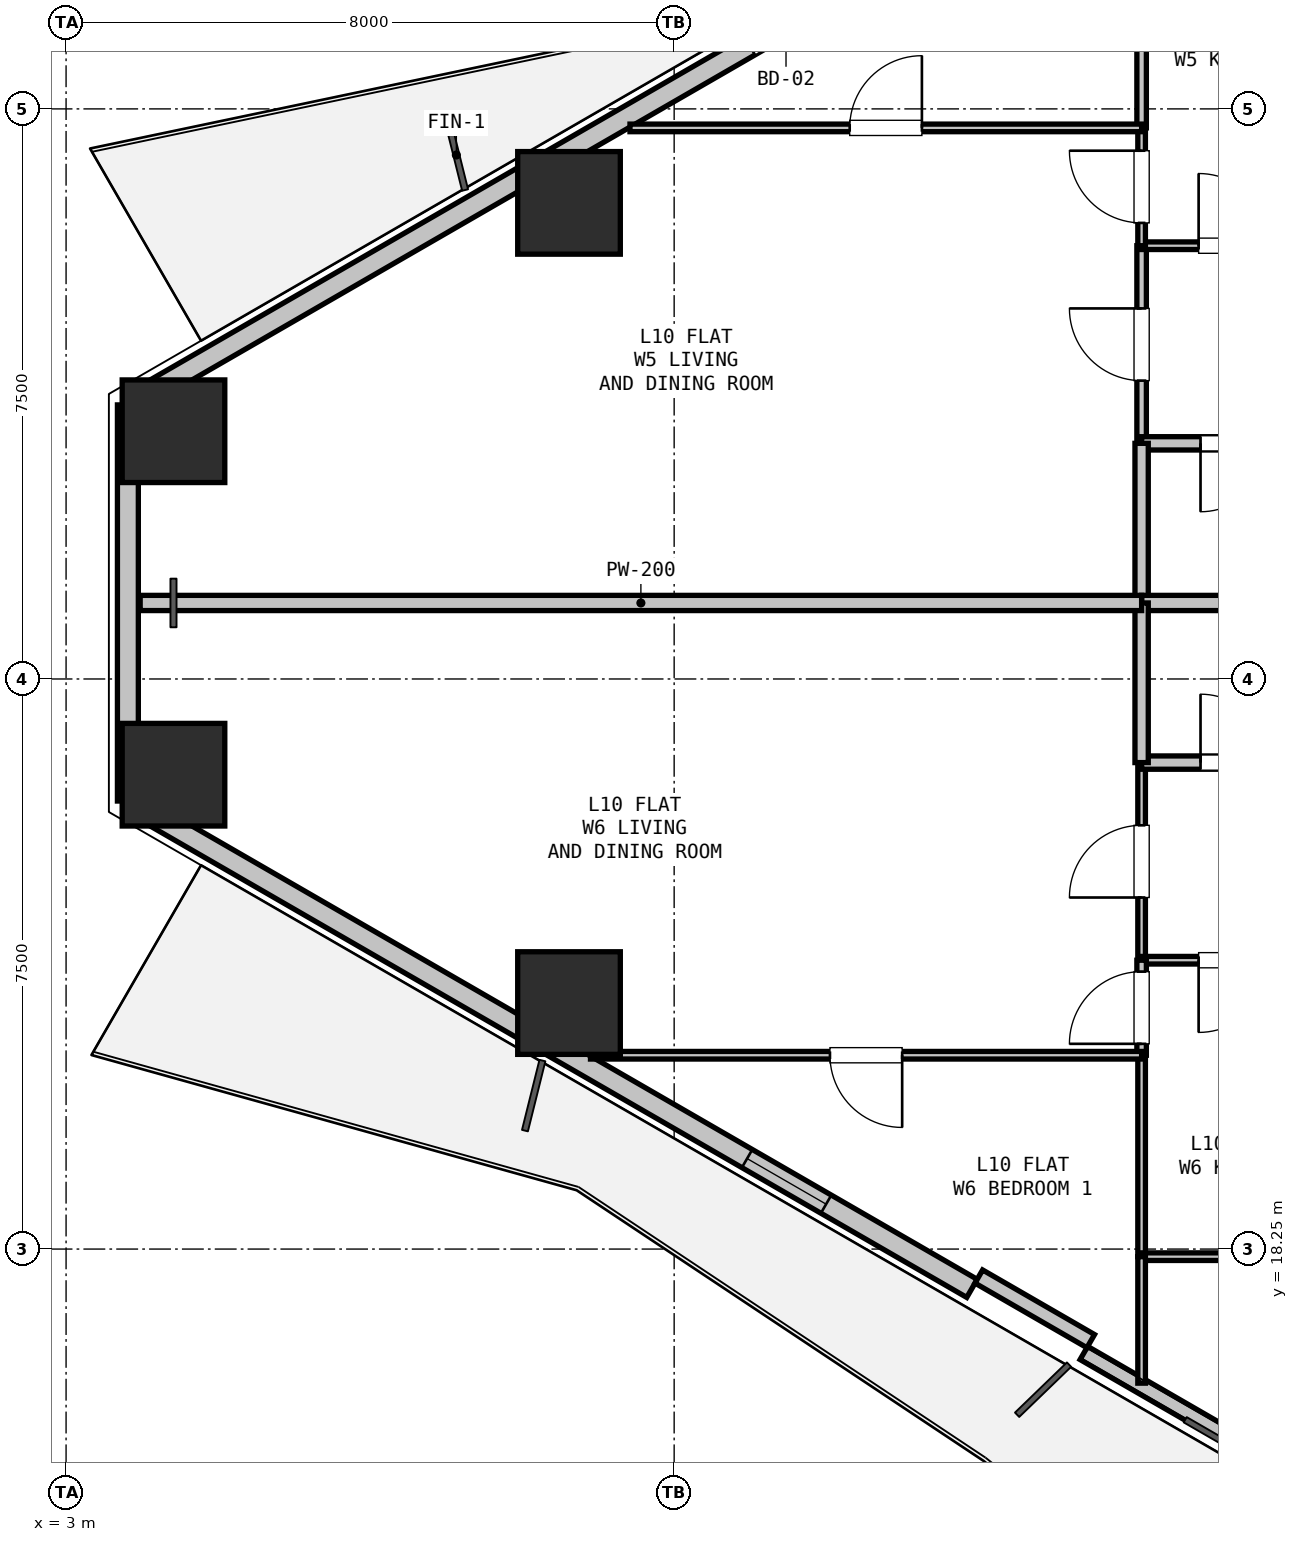
"""IFC4 building model, lengths in metres.
Left out: names, types, materials, properties, quantities, classifications, styles, units other than length and angle.
Written with IfcOpenShell. Run it as: python <this file> out.ifc"""

import sys

from ifc_helpers import new_model, si_unit, direction, frame, frame_2d, origin, origin_2d, place, context, subcontext, project, spatial, rectangle, hollow_rectangle, extrude, element, fill, save


model = new_model("IFC4")
c1 = context("Model", 3, precision=1e-05, world=origin(), true_north=direction((0.0, 1.0)))
c2 = subcontext(c1, "Body", "Model", "MODEL_VIEW")
j1 = project(units=[si_unit("LENGTHUNIT", "METRE"), si_unit("PLANEANGLEUNIT", "RADIAN")], contexts=[c1])
p1 = place(None, origin())
s1 = spatial("IfcSite", under=j1, at=p1, CompositionType="ELEMENT")
p2 = place(p1, origin())
s2 = spatial("IfcBuilding", under=s1, at=p2, CompositionType="ELEMENT")
p3 = place(p2, frame((0.0, 0.0, 39.0)))
s3 = spatial("IfcBuildingStorey", under=s2, at=p3, CompositionType="ELEMENT", Elevation=39.0)
for number, where, z_axis, x_axis in (
    (1, (4.413, 29.009, 0.0), (0.0, 0.0, 1.0), (1.0, 0.0, 0.0)),
    (2, (9.617, 32.014, 0.0), (0.0, 0.0, 1.0), (1.0, 0.0, 0.0)),
    (3, (9.617, 21.486, 0.0), (0.0, 0.0, 1.0), (1.0, 0.0, 0.0)),
    (4, (4.413, 24.491, 0.0), (0.0, 0.0, 1.0), (1.0, 0.0, 0.0)),
):
    element("IfcColumn", number, at=place(p3, frame(where, z_axis=z_axis, x_axis=x_axis)), inside=s3, PredefinedType="COLUMN", context=c2, shape_type="SweptSolid", body=[
        extrude(hollow_rectangle(XDim=1.35, YDim=1.35, WallThickness=0.036, at=origin_2d()), origin(), (0.0, 0.0, 1.0), 3.3),
    ])
p4 = place(p3, frame((3.813, 24.144, 0.0), z_axis=(0.0, 0.0, 1.0), x_axis=(0.0, 1.0, 0.0)))
e5 = element("IfcWall", 5, at=p4, inside=s3, PredefinedType="SOLIDWALL", context=c2, shape_type="SweptSolid", body=[
    extrude(rectangle(XDim=5.211, YDim=0.275, at=frame_2d((2.606, 0.0))), origin(), (0.0, 0.0, 1.0), 2.66),
])
p5 = place(p3, frame((3.943, 29.431, 0.0), z_axis=(0.0, 0.0, 1.0), x_axis=(0.866027105532, 0.499997052475, 0.0)))
e6 = element("IfcWall", 6, at=p5, inside=s3, PredefinedType="SOLIDWALL", context=c2, shape_type="SweptSolid", body=[
    extrude(rectangle(XDim=12.673, YDim=0.275, at=frame_2d((6.336, 0.0))), origin(), (0.0, 0.0, 1.0), 2.66),
])
p6 = place(p5, frame((9.298, 0.0, 0.0)))
e7 = element("IfcOpeningElement", 7, at=p6, cuts=e6, PredefinedType="OPENING", context=c2, shape_type="SweptSolid", body=[
    extrude(rectangle(XDim=1.1, YDim=2.1, at=frame_2d((0.55, 1.05))), frame((0.0, 0.147, 0.0), z_axis=(0.0, -1.0, 0.0), x_axis=(1.0, 0.0, 0.0)), (0.0, 0.0, 1.0), 0.295),
])
p7 = place(p3, frame((26.76, 10.896, 0.0), z_axis=(0.0, 0.0, 1.0), x_axis=(-0.866027351828, 0.499996625875, 0.0)))
e8 = element("IfcWall", 8, at=p7, inside=s3, PredefinedType="PARAPET", context=c2, shape_type="SweptSolid", body=[
    extrude(rectangle(XDim=11.973, YDim=0.2, at=frame_2d((5.987, 0.0))), origin(), (0.0, 0.0, 1.0), 0.2),
])
p8 = place(p3, frame((14.918, 17.733, 0.0), z_axis=(0.0, 0.0, 1.0), x_axis=(-0.866027105532, 0.499997052475, 0.0)))
e9 = element("IfcWall", 9, at=p8, inside=s3, PredefinedType="SOLIDWALL", context=c2, shape_type="SweptSolid", body=[
    extrude(rectangle(XDim=12.673, YDim=0.275, at=frame_2d((6.336, 0.0))), origin(), (0.0, 0.0, 1.0), 2.66),
])
p9 = place(p8, frame((2.216, 0.0, 0.9)))
e10 = element("IfcOpeningElement", 10, at=p9, cuts=e9, PredefinedType="OPENING", context=c2, shape_type="SweptSolid", body=[
    extrude(rectangle(XDim=1.2, YDim=1.4, at=frame_2d((0.6, 0.7))), frame((0.0, 0.147, 0.0), z_axis=(0.0, -1.0, 0.0), x_axis=(1.0, 0.0, 0.0)), (0.0, 0.0, 1.0), 0.295),
])
p10 = place(p3, frame((16.48, 17.039, 0.0), z_axis=(0.0, 0.0, 1.0), x_axis=(-0.86605165483, 0.499954529098, 0.0)))
e11 = element("IfcWall", 11, at=p10, inside=s3, PredefinedType="PARAPET", context=c2, shape_type="SweptSolid", body=[
    extrude(rectangle(XDim=1.7, YDim=0.2, at=frame_2d((0.85, 0.0))), origin(), (0.0, 0.0, 1.0), 2.66),
])
p11 = place(p3, frame((17.15, 28.85, 0.0), z_axis=(0.0, 0.0, 1.0), x_axis=(0.0, 1.0, 0.0)))
e12 = element("IfcWall", 12, at=p11, inside=s3, PredefinedType="PARTITIONING", context=c2, shape_type="SweptSolid", body=[
    extrude(rectangle(XDim=2.6, YDim=0.125, at=frame_2d((1.3, 0.0))), origin(), (0.0, 0.0, 1.0), 3.04),
])
p12 = place(p11, frame((0.825, 0.0, 0.0)))
e13 = element("IfcOpeningElement", 13, at=p12, cuts=e12, PredefinedType="OPENING", context=c2, shape_type="SweptSolid", body=[
    extrude(rectangle(XDim=0.95, YDim=2.1, at=frame_2d((0.475, 1.05))), frame((0.0, 0.073, 0.0), z_axis=(0.0, -1.0, 0.0), x_axis=(1.0, 0.0, 0.0)), (0.0, 0.0, 1.0), 0.145),
])
p13 = place(p3, frame((17.15, 31.45, 0.0), z_axis=(0.0, 0.0, 1.0), x_axis=(1.0, 0.0, 0.0)))
e14 = element("IfcWall", 14, at=p13, inside=s3, PredefinedType="PARTITIONING", context=c2, shape_type="SweptSolid", body=[
    extrude(rectangle(XDim=2.45, YDim=0.1, at=frame_2d((1.225, 0.0))), origin(), (0.0, 0.0, 1.0), 3.04),
])
p14 = place(p13, frame((0.75, 0.0, 0.0)))
e15 = element("IfcOpeningElement", 15, at=p14, cuts=e14, PredefinedType="OPENING", context=c2, shape_type="SweptSolid", body=[
    extrude(rectangle(XDim=0.95, YDim=2.1, at=frame_2d((0.475, 1.05))), frame((0.0, 0.06, 0.0), z_axis=(0.0, -1.0, 0.0), x_axis=(1.0, 0.0, 0.0)), (0.0, 0.0, 1.0), 0.12),
])
p15 = place(p3, frame((19.6, 28.85, 0.0), z_axis=(0.0, 0.0, 1.0), x_axis=(-1.0, 0.0, 0.0)))
e16 = element("IfcWall", 16, at=p15, inside=s3, PredefinedType="PLUMBINGWALL", context=c2, shape_type="SweptSolid", body=[
    extrude(rectangle(XDim=2.45, YDim=0.175, at=frame_2d((1.225, 0.0))), origin(), (0.0, 0.0, 1.0), 3.04),
])
p16 = place(p15, frame((0.775, 0.0, 0.0)))
e17 = element("IfcOpeningElement", 17, at=p16, cuts=e16, PredefinedType="OPENING", context=c2, shape_type="SweptSolid", body=[
    extrude(rectangle(XDim=0.9, YDim=2.1, at=frame_2d((0.45, 1.05))), frame((0.0, 0.097, 0.0), z_axis=(0.0, -1.0, 0.0), x_axis=(1.0, 0.0, 0.0)), (0.0, 0.0, 1.0), 0.195),
])
p17 = place(p3, frame((17.15, 22.05, 0.0), z_axis=(0.0, 0.0, 1.0), x_axis=(0.0, 1.0, 0.0)))
e18 = element("IfcWall", 18, at=p17, inside=s3, PredefinedType="PARTITIONING", context=c2, shape_type="SweptSolid", body=[
    extrude(rectangle(XDim=2.6, YDim=0.1, at=frame_2d((1.3, 0.0))), origin(), (0.0, 0.0, 1.0), 3.04),
])
p18 = place(p17, frame((0.825, 0.0, 0.0)))
e19 = element("IfcOpeningElement", 19, at=p18, cuts=e18, PredefinedType="OPENING", context=c2, shape_type="SweptSolid", body=[
    extrude(rectangle(XDim=0.95, YDim=2.1, at=frame_2d((0.475, 1.05))), frame((0.0, 0.06, 0.0), z_axis=(0.0, -1.0, 0.0), x_axis=(1.0, 0.0, 0.0)), (0.0, 0.0, 1.0), 0.12),
])
p19 = place(p3, frame((17.15, 24.65, 0.0), z_axis=(0.0, 0.0, 1.0), x_axis=(1.0, 0.0, 0.0)))
e20 = element("IfcWall", 20, at=p19, inside=s3, PredefinedType="PLUMBINGWALL", context=c2, shape_type="SweptSolid", body=[
    extrude(rectangle(XDim=2.45, YDim=0.175, at=frame_2d((1.225, 0.0))), origin(), (0.0, 0.0, 1.0), 3.04),
])
p20 = place(p19, frame((0.775, 0.0, 0.0)))
e21 = element("IfcOpeningElement", 21, at=p20, cuts=e20, PredefinedType="OPENING", context=c2, shape_type="SweptSolid", body=[
    extrude(rectangle(XDim=0.9, YDim=2.1, at=frame_2d((0.45, 1.05))), frame((0.0, 0.097, 0.0), z_axis=(0.0, -1.0, 0.0), x_axis=(1.0, 0.0, 0.0)), (0.0, 0.0, 1.0), 0.195),
])
p21 = place(p3, frame((19.6, 22.05, 0.0), z_axis=(0.0, 0.0, 1.0), x_axis=(-1.0, 0.0, 0.0)))
e22 = element("IfcWall", 22, at=p21, inside=s3, PredefinedType="PARTITIONING", context=c2, shape_type="SweptSolid", body=[
    extrude(rectangle(XDim=2.45, YDim=0.1, at=frame_2d((1.225, 0.0))), origin(), (0.0, 0.0, 1.0), 3.04),
])
p22 = place(p21, frame((0.75, 0.0, 0.0)))
e23 = element("IfcOpeningElement", 23, at=p22, cuts=e22, PredefinedType="OPENING", context=c2, shape_type="SweptSolid", body=[
    extrude(rectangle(XDim=0.95, YDim=2.1, at=frame_2d((0.475, 1.05))), frame((0.0, 0.06, 0.0), z_axis=(0.0, -1.0, 0.0), x_axis=(1.0, 0.0, 0.0)), (0.0, 0.0, 1.0), 0.12),
])
p23 = place(p3, frame((17.15, 26.75, 0.0), z_axis=(0.0, 0.0, 1.0), x_axis=(0.0, 1.0, 0.0)))
e24 = element("IfcWall", 24, at=p23, inside=s3, PredefinedType="PLUMBINGWALL", context=c2, shape_type="SweptSolid", body=[
    extrude(rectangle(XDim=2.1, YDim=0.175, at=frame_2d((1.05, 0.0))), origin(), (0.0, 0.0, 1.0), 3.04),
])
p24 = place(p3, frame((19.6, 26.75, 0.0), z_axis=(0.0, 0.0, 1.0), x_axis=(-1.0, 0.0, 0.0)))
e25 = element("IfcWall", 25, at=p24, inside=s3, PredefinedType="PARTITIONING", context=c2, shape_type="SweptSolid", body=[
    extrude(rectangle(XDim=2.45, YDim=0.2, at=frame_2d((1.225, 0.0))), origin(), (0.0, 0.0, 1.0), 3.04),
])
p25 = place(p3, frame((17.15, 31.45, 0.0), z_axis=(0.0, 0.0, 1.0), x_axis=(0.0, 1.0, 0.0)))
e26 = element("IfcWall", 26, at=p25, inside=s3, PredefinedType="PARTITIONING", context=c2, shape_type="SweptSolid", body=[
    extrude(rectangle(XDim=1.55, YDim=0.1, at=frame_2d((0.775, 0.0))), origin(), (0.0, 0.0, 1.0), 2.337),
])
p26 = place(p25, frame((0.3, 0.0, 0.0)))
e27 = element("IfcOpeningElement", 27, at=p26, cuts=e26, PredefinedType="OPENING", context=c2, shape_type="SweptSolid", body=[
    extrude(rectangle(XDim=0.95, YDim=2.1, at=frame_2d((0.475, 1.05))), frame((0.0, 0.06, 0.0), z_axis=(0.0, -1.0, 0.0), x_axis=(1.0, 0.0, 0.0)), (0.0, 0.0, 1.0), 0.12),
])
p27 = place(p3, frame((17.15, 33.0, 0.0), z_axis=(0.0, 0.0, 1.0), x_axis=(0.0, 1.0, 0.0)))
e28 = element("IfcWall", 28, at=p27, inside=s3, PredefinedType="PARTITIONING", context=c2, shape_type="SweptSolid", body=[
    extrude(rectangle(XDim=2.35, YDim=0.125, at=frame_2d((1.175, 0.0))), origin(), (0.0, 0.0, 1.0), 3.04),
])
p28 = place(p3, frame((17.15, 24.65, 0.0), z_axis=(0.0, 0.0, 1.0), x_axis=(0.0, 1.0, 0.0)))
e29 = element("IfcWall", 29, at=p28, inside=s3, PredefinedType="PLUMBINGWALL", context=c2, shape_type="SweptSolid", body=[
    extrude(rectangle(XDim=2.1, YDim=0.175, at=frame_2d((1.05, 0.0))), origin(), (0.0, 0.0, 1.0), 3.04),
])
p29 = place(p3, frame((17.15, 18.15, 0.0), z_axis=(0.0, 0.0, 1.0), x_axis=(0.0, 1.0, 0.0)))
e30 = element("IfcWall", 30, at=p29, inside=s3, PredefinedType="PARTITIONING", context=c2, shape_type="SweptSolid", body=[
    extrude(rectangle(XDim=2.65, YDim=0.1, at=frame_2d((1.325, 0.0))), origin(), (0.0, 0.0, 1.0), 3.04),
])
p30 = place(p3, frame((17.15, 20.8, 0.0), z_axis=(0.0, 0.0, 1.0), x_axis=(0.0, 1.0, 0.0)))
e31 = element("IfcWall", 31, at=p30, inside=s3, PredefinedType="PARTITIONING", context=c2, shape_type="SweptSolid", body=[
    extrude(rectangle(XDim=1.25, YDim=0.125, at=frame_2d((0.625, 0.0))), origin(), (0.0, 0.0, 1.0), 2.337),
])
p31 = place(p30, frame((0.15, 0.0, 0.0)))
e32 = element("IfcOpeningElement", 32, at=p31, cuts=e31, PredefinedType="OPENING", context=c2, shape_type="SweptSolid", body=[
    extrude(rectangle(XDim=0.95, YDim=2.1, at=frame_2d((0.475, 1.05))), frame((0.0, 0.073, 0.0), z_axis=(0.0, -1.0, 0.0), x_axis=(1.0, 0.0, 0.0)), (0.0, 0.0, 1.0), 0.145),
])
p32 = place(p3, frame((19.6, 18.15, 0.0), z_axis=(0.0, 0.0, 1.0), x_axis=(-1.0, 0.0, 0.0)))
e33 = element("IfcWall", 33, at=p32, inside=s3, PredefinedType="PARTITIONING", context=c2, shape_type="SweptSolid", body=[
    extrude(rectangle(XDim=2.45, YDim=0.1, at=frame_2d((1.225, 0.0))), origin(), (0.0, 0.0, 1.0), 3.04),
])
p33 = place(p3, frame((10.419, 33.0, 0.0), z_axis=(0.0, 0.0, 1.0), x_axis=(1.0, 0.0, 0.0)))
e34 = element("IfcWall", 34, at=p33, inside=s3, PredefinedType="PARTITIONING", context=c2, shape_type="SweptSolid", body=[
    extrude(rectangle(XDim=6.731, YDim=0.1, at=frame_2d((3.365, 0.0))), origin(), (0.0, 0.0, 1.0), 2.365),
])
p34 = place(p33, frame((2.89, 0.0, 0.0)))
e35 = element("IfcOpeningElement", 35, at=p34, cuts=e34, PredefinedType="OPENING", context=c2, shape_type="SweptSolid", body=[
    extrude(rectangle(XDim=0.95, YDim=2.1, at=frame_2d((0.475, 1.05))), frame((0.0, 0.06, 0.0), z_axis=(0.0, -1.0, 0.0), x_axis=(1.0, 0.0, 0.0)), (0.0, 0.0, 1.0), 0.12),
])
p35 = place(p3, frame((17.15, 26.75, 0.0), z_axis=(0.0, 0.0, 1.0), x_axis=(-1.0, 0.0, 0.0)))
e36 = element("IfcWall", 36, at=p35, inside=s3, PredefinedType="PARTITIONING", context=c2, shape_type="SweptSolid", body=[
    extrude(rectangle(XDim=13.175, YDim=0.2, at=frame_2d((6.588, 0.0))), origin(), (0.0, 0.0, 1.0), 2.65),
])
p36 = place(p3, frame((3.813, 29.356, 0.0), z_axis=(0.0, 0.0, 1.0), x_axis=(0.866131372301, 0.499816412211, 0.0)))
e37 = element("IfcWall", 37, at=p36, inside=s3, PredefinedType="PARTITIONING", context=c2, shape_type="SweptSolid", body=[
    extrude(rectangle(XDim=0.15, YDim=0.1, at=frame_2d((0.075, 0.0))), origin(), (0.0, 0.0, 1.0), 3.04),
])
p37 = place(p3, frame((17.15, 20.8, 0.0), z_axis=(0.0, 0.0, 1.0), x_axis=(-1.0, 0.0, 0.0)))
e38 = element("IfcWall", 38, at=p37, inside=s3, PredefinedType="PARTITIONING", context=c2, shape_type="SweptSolid", body=[
    extrude(rectangle(XDim=7.25, YDim=0.1, at=frame_2d((3.625, 0.0))), origin(), (0.0, 0.0, 1.0), 2.365),
])
p38 = place(p37, frame((3.15, 0.0, 0.0)))
e39 = element("IfcOpeningElement", 39, at=p38, cuts=e38, PredefinedType="OPENING", context=c2, shape_type="SweptSolid", body=[
    extrude(rectangle(XDim=0.95, YDim=2.1, at=frame_2d((0.475, 1.05))), frame((0.0, 0.06, 0.0), z_axis=(0.0, -1.0, 0.0), x_axis=(1.0, 0.0, 0.0)), (0.0, 0.0, 1.0), 0.12),
])
p39 = place(p3, frame((3.943, 24.069, 0.0), z_axis=(0.0, 0.0, 1.0), x_axis=(-0.866131372301, 0.499816412211, 0.0)))
e40 = element("IfcWall", 40, at=p39, inside=s3, PredefinedType="PARTITIONING", context=c2, shape_type="SweptSolid", body=[
    extrude(rectangle(XDim=0.15, YDim=0.125, at=frame_2d((0.075, 0.0))), origin(), (0.0, 0.0, 1.0), 3.04),
])
p40 = place(p3, frame((17.15, 18.15, 0.0), z_axis=(0.0, 0.0, 1.0), x_axis=(0.0, -1.0, 0.0)))
e41 = element("IfcWall", 41, at=p40, inside=s3, PredefinedType="PARTITIONING", context=c2, shape_type="SweptSolid", body=[
    extrude(rectangle(XDim=1.664, YDim=0.1, at=frame_2d((0.832, 0.0))), origin(), (0.0, 0.0, 1.0), 2.365),
])
p41 = place(p9, origin())
e42 = element("IfcWindow", 42, at=p41, inside=s3, PartitioningType="SINGLE_PANEL", PredefinedType="WINDOW", context=c2, shape_type="SweptSolid", body=[
    extrude(rectangle(XDim=1.2, YDim=1.4, at=frame_2d((0.6, 0.7))), frame((0.0, 0.03, 0.0), z_axis=(0.0, -1.0, 0.0), x_axis=(1.0, 0.0, 0.0)), (0.0, 0.0, 1.0), 0.06),
])
fill(e10, e42)
p42 = place(p16, origin())
e43 = element("IfcDoor", 43, at=p42, inside=s3, OperationType="SINGLE_SWING_RIGHT", PredefinedType="DOOR", context=c2, shape_type="SweptSolid", body=[
    extrude(rectangle(XDim=0.9, YDim=2.1, at=frame_2d((0.45, 1.05))), frame((0.0, 0.025, 0.0), z_axis=(0.0, -1.0, 0.0), x_axis=(1.0, 0.0, 0.0)), (0.0, 0.0, 1.0), 0.05),
])
fill(e17, e43)
p43 = place(p14, origin())
e44 = element("IfcDoor", 44, at=p43, inside=s3, OperationType="SINGLE_SWING_LEFT", PredefinedType="DOOR", context=c2, shape_type="SweptSolid", body=[
    extrude(rectangle(XDim=0.95, YDim=2.1, at=frame_2d((0.475, 1.05))), frame((0.0, 0.025, 0.0), z_axis=(0.0, -1.0, 0.0), x_axis=(1.0, 0.0, 0.0)), (0.0, 0.0, 1.0), 0.05),
])
fill(e15, e44)
p44 = place(p12, origin())
e45 = element("IfcDoor", 45, at=p44, inside=s3, OperationType="SINGLE_SWING_RIGHT", PredefinedType="DOOR", context=c2, shape_type="SweptSolid", body=[
    extrude(rectangle(XDim=0.95, YDim=2.1, at=frame_2d((0.475, 1.05))), frame((0.0, 0.025, 0.0), z_axis=(0.0, -1.0, 0.0), x_axis=(1.0, 0.0, 0.0)), (0.0, 0.0, 1.0), 0.05),
])
fill(e13, e45)
p45 = place(p20, origin())
e46 = element("IfcDoor", 46, at=p45, inside=s3, OperationType="SINGLE_SWING_LEFT", PredefinedType="DOOR", context=c2, shape_type="SweptSolid", body=[
    extrude(rectangle(XDim=0.9, YDim=2.1, at=frame_2d((0.45, 1.05))), frame((0.0, 0.025, 0.0), z_axis=(0.0, -1.0, 0.0), x_axis=(1.0, 0.0, 0.0)), (0.0, 0.0, 1.0), 0.05),
])
fill(e21, e46)
p46 = place(p22, origin())
e47 = element("IfcDoor", 47, at=p46, inside=s3, OperationType="SINGLE_SWING_RIGHT", PredefinedType="DOOR", context=c2, shape_type="SweptSolid", body=[
    extrude(rectangle(XDim=0.95, YDim=2.1, at=frame_2d((0.475, 1.05))), frame((0.0, 0.025, 0.0), z_axis=(0.0, -1.0, 0.0), x_axis=(1.0, 0.0, 0.0)), (0.0, 0.0, 1.0), 0.05),
])
fill(e23, e47)
p47 = place(p18, origin())
e48 = element("IfcDoor", 48, at=p47, inside=s3, OperationType="SINGLE_SWING_LEFT", PredefinedType="DOOR", context=c2, shape_type="SweptSolid", body=[
    extrude(rectangle(XDim=0.95, YDim=2.1, at=frame_2d((0.475, 1.05))), frame((0.0, 0.025, 0.0), z_axis=(0.0, -1.0, 0.0), x_axis=(1.0, 0.0, 0.0)), (0.0, 0.0, 1.0), 0.05),
])
fill(e19, e48)
p48 = place(p26, origin())
e49 = element("IfcDoor", 49, at=p48, inside=s3, OperationType="SINGLE_SWING_RIGHT", PredefinedType="DOOR", context=c2, shape_type="SweptSolid", body=[
    extrude(rectangle(XDim=0.95, YDim=2.1, at=frame_2d((0.475, 1.05))), frame((0.0, 0.025, 0.0), z_axis=(0.0, -1.0, 0.0), x_axis=(1.0, 0.0, 0.0)), (0.0, 0.0, 1.0), 0.05),
])
fill(e27, e49)
p49 = place(p31, origin())
e50 = element("IfcDoor", 50, at=p49, inside=s3, OperationType="SINGLE_SWING_LEFT", PredefinedType="DOOR", context=c2, shape_type="SweptSolid", body=[
    extrude(rectangle(XDim=0.95, YDim=2.1, at=frame_2d((0.475, 1.05))), frame((0.0, 0.025, 0.0), z_axis=(0.0, -1.0, 0.0), x_axis=(1.0, 0.0, 0.0)), (0.0, 0.0, 1.0), 0.05),
])
fill(e32, e50)
p50 = place(p34, origin())
e51 = element("IfcDoor", 51, at=p50, inside=s3, OperationType="SINGLE_SWING_RIGHT", PredefinedType="DOOR", context=c2, shape_type="SweptSolid", body=[
    extrude(rectangle(XDim=0.95, YDim=2.1, at=frame_2d((0.475, 1.05))), frame((0.0, 0.025, 0.0), z_axis=(0.0, -1.0, 0.0), x_axis=(1.0, 0.0, 0.0)), (0.0, 0.0, 1.0), 0.05),
])
fill(e35, e51)
p51 = place(p38, origin())
e52 = element("IfcDoor", 52, at=p51, inside=s3, OperationType="SINGLE_SWING_LEFT", PredefinedType="DOOR", context=c2, shape_type="SweptSolid", body=[
    extrude(rectangle(XDim=0.95, YDim=2.1, at=frame_2d((0.475, 1.05))), frame((0.0, 0.025, 0.0), z_axis=(0.0, -1.0, 0.0), x_axis=(1.0, 0.0, 0.0)), (0.0, 0.0, 1.0), 0.05),
])
fill(e39, e52)
save(model, sys.argv[1])
